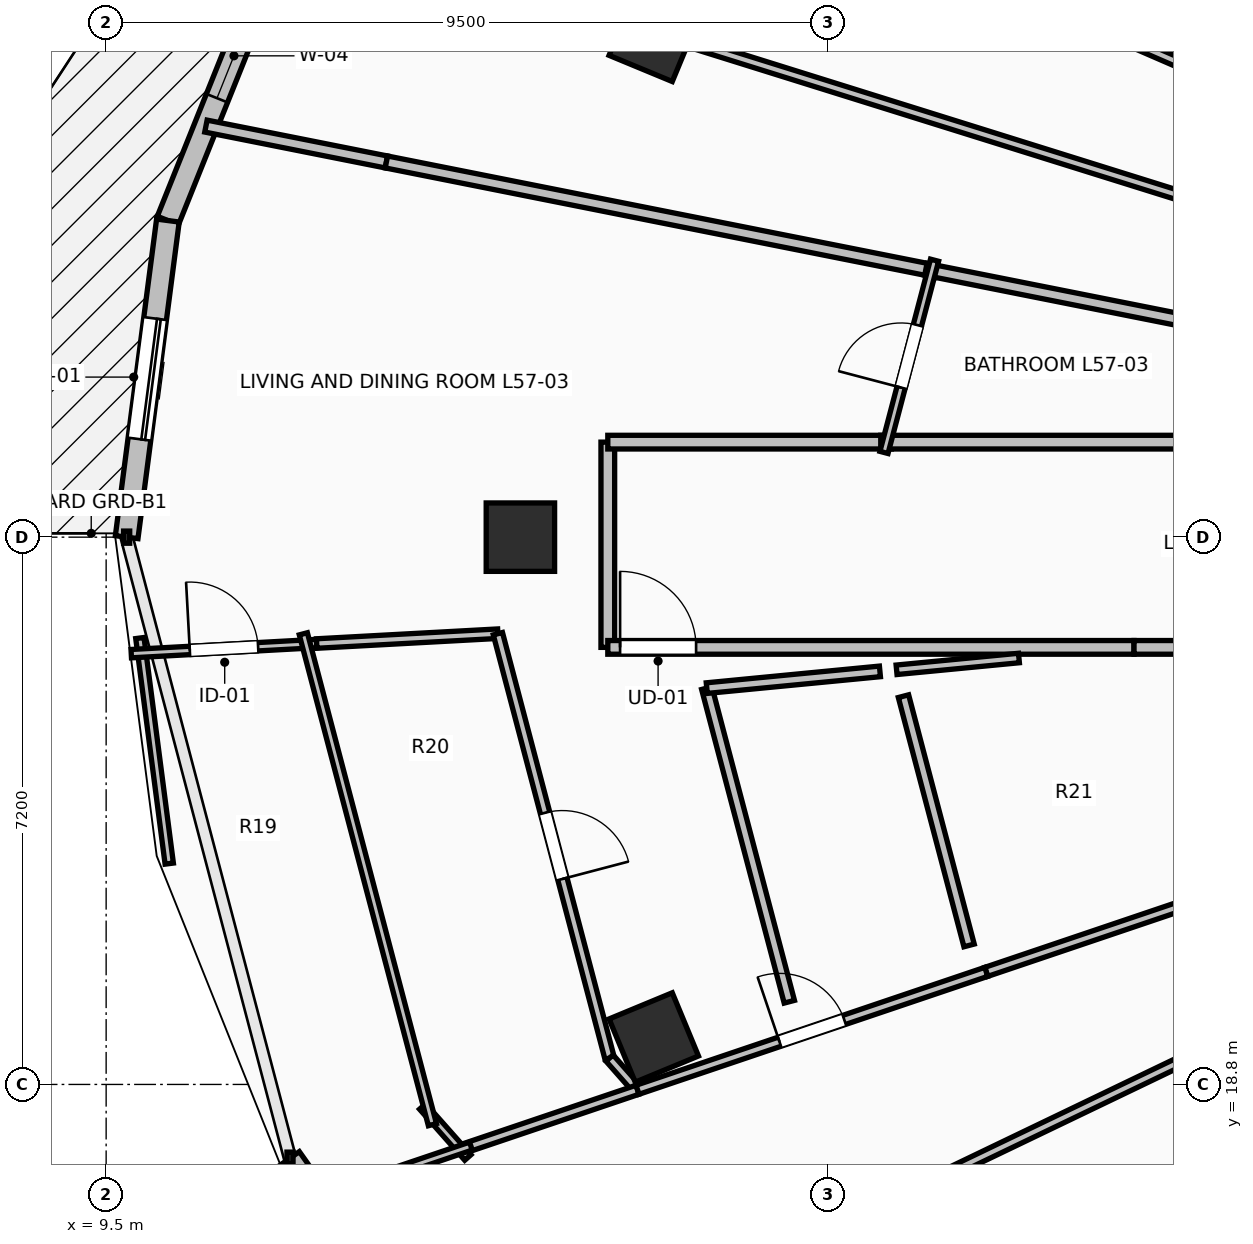
"""IFC4 building model, lengths in metres.
Left out: names, types, materials, properties, quantities, classifications, styles, units other than length and angle.
Written with IfcOpenShell. Run it as: python <this file> out.ifc"""

import sys

from ifc_helpers import new_model, si_unit, direction, frame, frame_2d, origin, origin_2d, place, context, subcontext, project, spatial, rectangle, extrude, element, fill, save


model = new_model("IFC4")
c1 = context("Model", 3, precision=1e-05, world=origin(), true_north=direction((0.0, 1.0)))
c2 = subcontext(c1, "Body", "Model", "MODEL_VIEW")
j1 = project(units=[si_unit("LENGTHUNIT", "METRE"), si_unit("PLANEANGLEUNIT", "RADIAN")], contexts=[c1])
p1 = place(None, origin())
s1 = spatial("IfcSite", under=j1, at=p1, CompositionType="ELEMENT")
p2 = place(p1, origin())
s2 = spatial("IfcBuilding", under=s1, at=p2, CompositionType="ELEMENT")
p3 = place(p2, frame((0.0, 0.0, 210.75)))
s3 = spatial("IfcBuildingStorey", under=s2, at=p3, CompositionType="ELEMENT", Elevation=210.75)
for number, where, z_axis, x_axis in (
    (1, (16.705, 32.582, 0.0), (0.0, 0.0, 1.0), (-0.924, 0.383, 0.0)),
    (2, (14.95, 26.0, 0.0), (0.0, 0.0, 1.0), (-1.0, 0.0, 0.0)),
    (3, (16.705, 19.418, 0.0), (0.0, 0.0, 1.0), (-0.924, -0.383, 0.0)),
):
    element("IfcColumn", number, at=place(p3, frame(where, z_axis=z_axis, x_axis=x_axis)), inside=s3, PredefinedType="COLUMN", context=c2, shape_type="SweptSolid", body=[
        extrude(rectangle(XDim=0.9, YDim=0.9, at=origin_2d()), origin(), (0.0, 0.0, 1.0), 3.55),
    ])
p4 = place(p3, frame((11.919, 34.17, 0.0), z_axis=(0.0, 0.0, 1.0), x_axis=(-0.372268409848, -0.928125116043, 0.0)))
e4 = element("IfcWall", 4, at=p4, inside=s3, PredefinedType="STANDARD", context=c2, shape_type="SweptSolid", body=[
    extrude(rectangle(XDim=4.315, YDim=0.3, at=frame_2d((2.158, 0.0))), origin(), (0.0, 0.0, 1.0), 3.29),
])
p5 = place(p4, frame((1.38, 0.0, 0.85)))
e5 = element("IfcOpeningElement", 5, at=p5, cuts=e4, PredefinedType="OPENING", context=c2, shape_type="SweptSolid", body=[
    extrude(rectangle(XDim=1.2, YDim=1.95, at=frame_2d((0.6, 0.975))), frame((0.0, 0.165, 0.0), z_axis=(0.0, -1.0, 0.0), x_axis=(1.0, 0.0, 0.0)), (0.0, 0.0, 1.0), 0.33),
])
p6 = place(p3, frame((10.312, 30.165, 0.0), z_axis=(0.0, 0.0, 1.0), x_axis=(-0.129147853268, -0.991625348605, 0.0)))
e6 = element("IfcWall", 6, at=p6, inside=s3, PredefinedType="STANDARD", context=c2, shape_type="SweptSolid", body=[
    extrude(rectangle(XDim=4.2, YDim=0.3, at=frame_2d((2.1, 0.0))), origin(), (0.0, 0.0, 1.0), 3.29),
])
p7 = place(p6, frame((1.3, 0.0, 0.0)))
e7 = element("IfcOpeningElement", 7, at=p7, cuts=e6, PredefinedType="OPENING", context=c2, shape_type="SweptSolid", body=[
    extrude(rectangle(XDim=1.6, YDim=2.3, at=frame_2d((0.8, 1.15))), frame((0.0, 0.165, 0.0), z_axis=(0.0, -1.0, 0.0), x_axis=(1.0, 0.0, 0.0)), (0.0, 0.0, 1.0), 0.33),
])
p8 = place(p3, frame((11.919, 17.83, 0.0), z_axis=(0.0, 0.0, 1.0), x_axis=(0.577168747264, -0.81662490605, 0.0)))
e8 = element("IfcWall", 8, at=p8, inside=s3, PredefinedType="STANDARD", context=c2, shape_type="SweptSolid", body=[
    extrude(rectangle(XDim=4.52, YDim=0.3, at=frame_2d((2.26, 0.0))), origin(), (0.0, 0.0, 1.0), 3.29),
])
p9 = place(p8, frame((1.69, 0.0, 0.85)))
e9 = element("IfcOpeningElement", 9, at=p9, cuts=e8, PredefinedType="OPENING", context=c2, shape_type="SweptSolid", body=[
    extrude(rectangle(XDim=1.2, YDim=1.95, at=frame_2d((0.6, 0.975))), frame((0.0, 0.165, 0.0), z_axis=(0.0, -1.0, 0.0), x_axis=(1.0, 0.0, 0.0)), (0.0, 0.0, 1.0), 0.33),
])
p10 = place(p3, frame((16.1, 27.25, 0.0), z_axis=(0.0, 0.0, 1.0), x_axis=(0.0, -1.0, 0.0)))
e10 = element("IfcWall", 10, at=p10, inside=s3, PredefinedType="PARTITIONING", context=c2, shape_type="SweptSolid", body=[
    extrude(rectangle(XDim=2.7, YDim=0.18, at=frame_2d((1.35, 0.0))), origin(), (0.0, 0.0, 1.0), 2.482),
])
p11 = place(p3, frame((16.1, 24.55, 0.0), z_axis=(0.0, 0.0, 1.0), x_axis=(1.0, 0.0, 0.0)))
e11 = element("IfcWall", 11, at=p11, inside=s3, PredefinedType="PARTITIONING", context=c2, shape_type="SweptSolid", body=[
    extrude(rectangle(XDim=6.923, YDim=0.18, at=frame_2d((3.461, 0.0))), origin(), (0.0, 0.0, 1.0), 2.936),
])
p12 = place(p11, frame((0.162, 0.0, 0.0)))
e12 = element("IfcOpeningElement", 12, at=p12, cuts=e11, PredefinedType="OPENING", context=c2, shape_type="SweptSolid", body=[
    extrude(rectangle(XDim=1.0, YDim=2.15, at=frame_2d((0.5, 1.075))), frame((0.0, 0.105, 0.0), z_axis=(0.0, -1.0, 0.0), x_axis=(1.0, 0.0, 0.0)), (0.0, 0.0, 1.0), 0.21),
])
p13 = place(p3, frame((19.831, 27.25, 0.0), z_axis=(0.0, 0.0, 1.0), x_axis=(-1.0, 0.0, 0.0)))
e13 = element("IfcWall", 13, at=p13, inside=s3, PredefinedType="PARTITIONING", context=c2, shape_type="SweptSolid", body=[
    extrude(rectangle(XDim=3.731, YDim=0.18, at=frame_2d((1.865, 0.0))), origin(), (0.0, 0.0, 1.0), 2.936),
])
p14 = place(p3, frame((23.023, 24.55, 0.0), z_axis=(0.0, 0.0, 1.0), x_axis=(1.0, 0.0, 0.0)))
e14 = element("IfcWall", 14, at=p14, inside=s3, PredefinedType="PARTITIONING", context=c2, shape_type="SweptSolid", body=[
    extrude(rectangle(XDim=2.177, YDim=0.18, at=frame_2d((1.088, 0.0))), origin(), (0.0, 0.0, 1.0), 2.979),
])
p15 = place(p3, frame((25.34, 27.25, 0.0), z_axis=(0.0, 0.0, 1.0), x_axis=(-1.0, 0.0, 0.0)))
e15 = element("IfcWall", 15, at=p15, inside=s3, PredefinedType="PARTITIONING", context=c2, shape_type="SweptSolid", body=[
    extrude(rectangle(XDim=5.649, YDim=0.18, at=frame_2d((2.825, 0.0))), origin(), (0.0, 0.0, 1.0), 2.482),
])
p16 = place(p3, frame((13.622, 36.578, 0.0), z_axis=(0.0, 0.0, 1.0), x_axis=(0.917357672996, -0.398063939331, 0.0)))
e16 = element("IfcWall", 16, at=p16, inside=s3, PredefinedType="PARTITIONING", context=c2, shape_type="SweptSolid", body=[
    extrude(rectangle(XDim=12.621, YDim=0.125, at=frame_2d((6.311, 0.0))), origin(), (0.0, 0.0, 1.0), 2.824),
])
p17 = place(p3, frame((11.911, 34.152, 0.0), z_axis=(0.0, 0.0, 1.0), x_axis=(0.954494953812, -0.298227066422, 0.0)))
e17 = element("IfcWall", 17, at=p17, inside=s3, PredefinedType="PARTITIONING", context=c2, shape_type="SweptSolid", body=[
    extrude(rectangle(XDim=13.923, YDim=0.125, at=frame_2d((6.961, 0.0))), origin(), (0.0, 0.0, 1.0), 2.482),
])
p18 = place(p3, frame((10.813, 31.408, 0.0), z_axis=(0.0, 0.0, 1.0), x_axis=(0.980808893275, -0.194971574527, 0.0)))
e18 = element("IfcWall", 18, at=p18, inside=s3, PredefinedType="PARTITIONING", context=c2, shape_type="SweptSolid", body=[
    extrude(rectangle(XDim=2.42, YDim=0.16, at=frame_2d((1.21, 0.0))), origin(), (0.0, 0.0, 1.0), 3.29),
])
p19 = place(p3, frame((13.187, 30.936, 0.0), z_axis=(0.0, 0.0, 1.0), x_axis=(0.980790143568, -0.195065871645, 0.0)))
e19 = element("IfcWall", 19, at=p19, inside=s3, PredefinedType="PARTITIONING", context=c2, shape_type="SweptSolid", body=[
    extrude(rectangle(XDim=7.377, YDim=0.16, at=frame_2d((3.688, 0.0))), origin(), (0.0, 0.0, 1.0), 2.824),
])
p20 = place(p3, frame((20.285, 29.524, 0.0), z_axis=(0.0, 0.0, 1.0), x_axis=(0.980782472544, -0.195104437547, 0.0)))
e20 = element("IfcWall", 20, at=p20, inside=s3, PredefinedType="PARTITIONING", context=c2, shape_type="SweptSolid", body=[
    extrude(rectangle(XDim=5.152, YDim=0.16, at=frame_2d((2.576, 0.0))), origin(), (0.0, 0.0, 1.0), 2.936),
])
p21 = place(p3, frame((19.899, 24.255, 0.0), z_axis=(0.0, 0.0, 1.0), x_axis=(0.995395189956, 0.095856224692, 0.0)))
e21 = element("IfcWall", 21, at=p21, inside=s3, PredefinedType="PARTITIONING", context=c2, shape_type="SweptSolid", body=[
    extrude(rectangle(XDim=1.617, YDim=0.125, at=frame_2d((0.809, 0.0))), origin(), (0.0, 0.0, 1.0), 2.936),
])
p22 = place(p3, frame((21.079, 20.281, 0.0), z_axis=(0.0, 0.0, 1.0), x_axis=(0.947333376301, 0.320249081413, 0.0)))
e22 = element("IfcWall", 22, at=p22, inside=s3, PredefinedType="PARTITIONING", context=c2, shape_type="SweptSolid", body=[
    extrude(rectangle(XDim=4.35, YDim=0.125, at=frame_2d((2.175, 0.0))), origin(), (0.0, 0.0, 1.0), 2.979),
])
p23 = place(p3, frame((19.733, 27.115, 0.0), z_axis=(0.0, 0.0, 1.0), x_axis=(0.254424362052, 0.967092676011, 0.0)))
e23 = element("IfcWall", 23, at=p23, inside=s3, PredefinedType="PARTITIONING", context=c2, shape_type="SweptSolid", body=[
    extrude(rectangle(XDim=2.615, YDim=0.11, at=frame_2d((1.307, 0.0))), origin(), (0.0, 0.0, 1.0), 2.482),
])
p24 = place(p23, frame((0.882, 0.0, 0.0)))
e24 = element("IfcOpeningElement", 24, at=p24, cuts=e23, PredefinedType="OPENING", context=c2, shape_type="SweptSolid", body=[
    extrude(rectangle(XDim=0.85, YDim=2.1, at=frame_2d((0.425, 1.05))), frame((0.0, 0.07, 0.0), z_axis=(0.0, -1.0, 0.0), x_axis=(1.0, 0.0, 0.0)), (0.0, 0.0, 1.0), 0.14),
])
p25 = place(p3, frame((9.944, 24.673, 0.0), z_axis=(0.0, 0.0, 1.0), x_axis=(0.129053207858, -0.991637670493, 0.0)))
e25 = element("IfcWall", 25, at=p25, inside=s3, PredefinedType="PARTITIONING", context=c2, shape_type="SweptSolid", body=[
    extrude(rectangle(XDim=2.993, YDim=0.11, at=frame_2d((1.497, 0.0))), origin(), (0.0, 0.0, 1.0), 3.29),
])
p26 = place(p3, frame((9.83, 24.467, 0.0), z_axis=(0.0, 0.0, 1.0), x_axis=(0.998510664793, 0.054556872108, 0.0)))
e26 = element("IfcWall", 26, at=p26, inside=s3, PredefinedType="PARTITIONING", context=c2, shape_type="SweptSolid", body=[
    extrude(rectangle(XDim=2.443, YDim=0.11, at=frame_2d((1.222, 0.0))), origin(), (0.0, 0.0, 1.0), 3.29),
])
p27 = place(p26, frame((0.771, 0.0, 0.0)))
e27 = element("IfcOpeningElement", 27, at=p27, cuts=e26, PredefinedType="OPENING", context=c2, shape_type="SweptSolid", body=[
    extrude(rectangle(XDim=0.9, YDim=2.1, at=frame_2d((0.45, 1.05))), frame((0.0, 0.07, 0.0), z_axis=(0.0, -1.0, 0.0), x_axis=(1.0, 0.0, 0.0)), (0.0, 0.0, 1.0), 0.14),
])
p28 = place(p3, frame((12.27, 24.601, 0.0), z_axis=(0.0, 0.0, 1.0), x_axis=(0.998530633022, 0.054190173613, 0.0)))
e28 = element("IfcWall", 28, at=p28, inside=s3, PredefinedType="PARTITIONING", context=c2, shape_type="SweptSolid", body=[
    extrude(rectangle(XDim=2.388, YDim=0.125, at=frame_2d((1.194, 0.0))), origin(), (0.0, 0.0, 1.0), 3.29),
])
p29 = place(p3, frame((14.654, 24.73, 0.0), z_axis=(0.0, 0.0, 1.0), x_axis=(0.254457911505, -0.967083849143, 0.0)))
e29 = element("IfcWall", 29, at=p29, inside=s3, PredefinedType="PARTITIONING", context=c2, shape_type="SweptSolid", body=[
    extrude(rectangle(XDim=5.773, YDim=0.125, at=frame_2d((2.886, 0.0))), origin(), (0.0, 0.0, 1.0), 3.29),
])
p30 = place(p29, frame((2.437, 0.0, 0.0)))
e30 = element("IfcOpeningElement", 30, at=p30, cuts=e29, PredefinedType="OPENING", context=c2, shape_type="SweptSolid", body=[
    extrude(rectangle(XDim=0.9, YDim=2.1, at=frame_2d((0.45, 1.05))), frame((0.0, 0.077, 0.0), z_axis=(0.0, -1.0, 0.0), x_axis=(1.0, 0.0, 0.0)), (0.0, 0.0, 1.0), 0.155),
])
p31 = place(p3, frame((16.123, 19.147, 0.0), z_axis=(0.0, 0.0, 1.0), x_axis=(0.661607116759, -0.749850667169, 0.0)))
e31 = element("IfcWall", 31, at=p31, inside=s3, PredefinedType="PARTITIONING", context=c2, shape_type="SweptSolid", body=[
    extrude(rectangle(XDim=0.556, YDim=0.125, at=frame_2d((0.278, 0.0))), origin(), (0.0, 0.0, 1.0), 3.29),
])
p32 = place(p3, frame((16.491, 18.73, 0.0), z_axis=(0.0, 0.0, 1.0), x_axis=(-0.94734184591, -0.320224026251, 0.0)))
e32 = element("IfcWall", 32, at=p32, inside=s3, PredefinedType="PARTITIONING", context=c2, shape_type="SweptSolid", body=[
    extrude(rectangle(XDim=2.454, YDim=0.125, at=frame_2d((1.227, 0.0))), origin(), (0.0, 0.0, 1.0), 3.29),
])
p33 = place(p3, frame((16.491, 18.73, 0.0), z_axis=(0.0, 0.0, 1.0), x_axis=(0.947333893653, 0.320247551023, 0.0)))
e33 = element("IfcWall", 33, at=p33, inside=s3, PredefinedType="PARTITIONING", context=c2, shape_type="SweptSolid", body=[
    extrude(rectangle(XDim=4.843, YDim=0.125, at=frame_2d((2.422, 0.0))), origin(), (0.0, 0.0, 1.0), 2.482),
])
p34 = place(p33, frame((1.971, 0.0, 0.0)))
e34 = element("IfcOpeningElement", 34, at=p34, cuts=e33, PredefinedType="OPENING", context=c2, shape_type="SweptSolid", body=[
    extrude(rectangle(XDim=0.9, YDim=2.1, at=frame_2d((0.45, 1.05))), frame((0.0, 0.077, 0.0), z_axis=(0.0, -1.0, 0.0), x_axis=(1.0, 0.0, 0.0)), (0.0, 0.0, 1.0), 0.155),
])
p35 = place(p3, frame((14.259, 17.839, 0.0), z_axis=(0.0, 0.0, 1.0), x_axis=(-0.662791157339, 0.748804301372, 0.0)))
e35 = element("IfcWall", 35, at=p35, inside=s3, PredefinedType="PARTITIONING", context=c2, shape_type="SweptSolid", body=[
    extrude(rectangle(XDim=0.897, YDim=0.11, at=frame_2d((0.448, 0.0))), origin(), (0.0, 0.0, 1.0), 3.29),
])
p36 = place(p3, frame((13.792, 18.271, 0.0), z_axis=(0.0, 0.0, 1.0), x_axis=(-0.254286331735, 0.967128978727, 0.0)))
e36 = element("IfcWall", 36, at=p36, inside=s3, PredefinedType="PARTITIONING", context=c2, shape_type="SweptSolid", body=[
    extrude(rectangle(XDim=6.677, YDim=0.11, at=frame_2d((3.339, 0.0))), origin(), (0.0, 0.0, 1.0), 3.29),
])
p37 = place(p3, frame((12.157, 17.265, 0.0), z_axis=(0.0, 0.0, 1.0), x_axis=(0.947357185378, 0.320178642812, 0.0)))
e37 = element("IfcWall", 37, at=p37, inside=s3, PredefinedType="PARTITIONING", context=c2, shape_type="SweptSolid", body=[
    extrude(rectangle(XDim=2.26, YDim=0.11, at=frame_2d((1.13, 0.0))), origin(), (0.0, 0.0, 1.0), 3.29),
])
p38 = place(p3, frame((14.217, 14.579, 0.0), z_axis=(0.0, 0.0, 1.0), x_axis=(0.901423599975, 0.432938209689, 0.0)))
e38 = element("IfcWall", 38, at=p38, inside=s3, PredefinedType="PARTITIONING", context=c2, shape_type="SweptSolid", body=[
    extrude(rectangle(XDim=12.184, YDim=0.125, at=frame_2d((6.092, 0.0))), origin(), (0.0, 0.0, 1.0), 2.482),
])
p39 = place(p3, frame((16.555, 12.272, 0.0), z_axis=(0.0, 0.0, 1.0), x_axis=(0.842221721565, 0.539131312135, 0.0)))
e39 = element("IfcWall", 39, at=p39, inside=s3, PredefinedType="PARTITIONING", context=c2, shape_type="SweptSolid", body=[
    extrude(rectangle(XDim=10.265, YDim=0.125, at=frame_2d((5.132, 0.0))), origin(), (0.0, 0.0, 1.0), 2.482),
])
p40 = place(p3, frame((18.488, 19.888, 0.0), z_axis=(0.0, 0.0, 1.0), x_axis=(-0.254527099131, 0.967065641933, 0.0)))
e40 = element("IfcWall", 40, at=p40, inside=s3, PredefinedType="PARTITIONING", context=c2, shape_type="SweptSolid", body=[
    extrude(rectangle(XDim=4.267, YDim=0.14, at=frame_2d((2.133, 0.0))), origin(), (0.0, 0.0, 1.0), 3.29),
])
p41 = place(p3, frame((17.402, 24.014, 0.0), z_axis=(0.0, 0.0, 1.0), x_axis=(0.99536946046, 0.096123031498, 0.0)))
e41 = element("IfcWall", 41, at=p41, inside=s3, PredefinedType="PARTITIONING", context=c2, shape_type="SweptSolid", body=[
    extrude(rectangle(XDim=2.288, YDim=0.14, at=frame_2d((1.144, 0.0))), origin(), (0.0, 0.0, 1.0), 2.936),
])
p42 = place(p3, frame((19.99, 23.908, 0.0), z_axis=(0.0, 0.0, 1.0), x_axis=(0.25452874074, -0.967065209868, 0.0)))
e42 = element("IfcWall", 42, at=p42, inside=s3, PredefinedType="PARTITIONING", context=c2, shape_type="SweptSolid", body=[
    extrude(rectangle(XDim=3.391, YDim=0.14, at=frame_2d((1.695, 0.0))), origin(), (0.0, 0.0, 1.0), 2.936),
])
p43 = place(p7, origin())
e43 = element("IfcDoor", 43, at=p43, inside=s3, OperationType="SLIDING_TO_LEFT", PredefinedType="DOOR", context=c2, shape_type="SweptSolid", body=[
    extrude(rectangle(XDim=1.6, YDim=2.3, at=frame_2d((0.8, 1.15))), frame((0.0, 0.025, 0.0), z_axis=(0.0, -1.0, 0.0), x_axis=(1.0, 0.0, 0.0)), (0.0, 0.0, 1.0), 0.05),
])
fill(e7, e43)
p44 = place(p5, origin())
e44 = element("IfcWindow", 44, at=p44, inside=s3, PartitioningType="SINGLE_PANEL", PredefinedType="WINDOW", context=c2, shape_type="SweptSolid", body=[
    extrude(rectangle(XDim=1.2, YDim=1.95, at=frame_2d((0.6, 0.975))), frame((0.0, 0.03, 0.0), z_axis=(0.0, -1.0, 0.0), x_axis=(1.0, 0.0, 0.0)), (0.0, 0.0, 1.0), 0.06),
])
fill(e5, e44)
p45 = place(p12, origin())
e45 = element("IfcDoor", 45, at=p45, inside=s3, OperationType="SINGLE_SWING_LEFT", PredefinedType="DOOR", context=c2, shape_type="SweptSolid", body=[
    extrude(rectangle(XDim=1.0, YDim=2.15, at=frame_2d((0.5, 1.075))), frame((0.0, 0.025, 0.0), z_axis=(0.0, -1.0, 0.0), x_axis=(1.0, 0.0, 0.0)), (0.0, 0.0, 1.0), 0.05),
])
fill(e12, e45)
p46 = place(p24, origin())
e46 = element("IfcDoor", 46, at=p46, inside=s3, OperationType="SINGLE_SWING_LEFT", PredefinedType="DOOR", context=c2, shape_type="SweptSolid", body=[
    extrude(rectangle(XDim=0.85, YDim=2.1, at=frame_2d((0.425, 1.05))), frame((0.0, 0.025, 0.0), z_axis=(0.0, -1.0, 0.0), x_axis=(1.0, 0.0, 0.0)), (0.0, 0.0, 1.0), 0.05),
])
fill(e24, e46)
p47 = place(p27, origin())
e47 = element("IfcDoor", 47, at=p47, inside=s3, OperationType="SINGLE_SWING_LEFT", PredefinedType="DOOR", context=c2, shape_type="SweptSolid", body=[
    extrude(rectangle(XDim=0.9, YDim=2.1, at=frame_2d((0.45, 1.05))), frame((0.0, 0.025, 0.0), z_axis=(0.0, -1.0, 0.0), x_axis=(1.0, 0.0, 0.0)), (0.0, 0.0, 1.0), 0.05),
])
fill(e27, e47)
p48 = place(p30, origin())
e48 = element("IfcDoor", 48, at=p48, inside=s3, OperationType="SINGLE_SWING_RIGHT", PredefinedType="DOOR", context=c2, shape_type="SweptSolid", body=[
    extrude(rectangle(XDim=0.9, YDim=2.1, at=frame_2d((0.45, 1.05))), frame((0.0, 0.025, 0.0), z_axis=(0.0, -1.0, 0.0), x_axis=(1.0, 0.0, 0.0)), (0.0, 0.0, 1.0), 0.05),
])
fill(e30, e48)
p49 = place(p34, origin())
e49 = element("IfcDoor", 49, at=p49, inside=s3, OperationType="SINGLE_SWING_LEFT", PredefinedType="DOOR", context=c2, shape_type="SweptSolid", body=[
    extrude(rectangle(XDim=0.9, YDim=2.1, at=frame_2d((0.45, 1.05))), frame((0.0, 0.025, 0.0), z_axis=(0.0, -1.0, 0.0), x_axis=(1.0, 0.0, 0.0)), (0.0, 0.0, 1.0), 0.05),
])
fill(e34, e49)
save(model, sys.argv[1])
